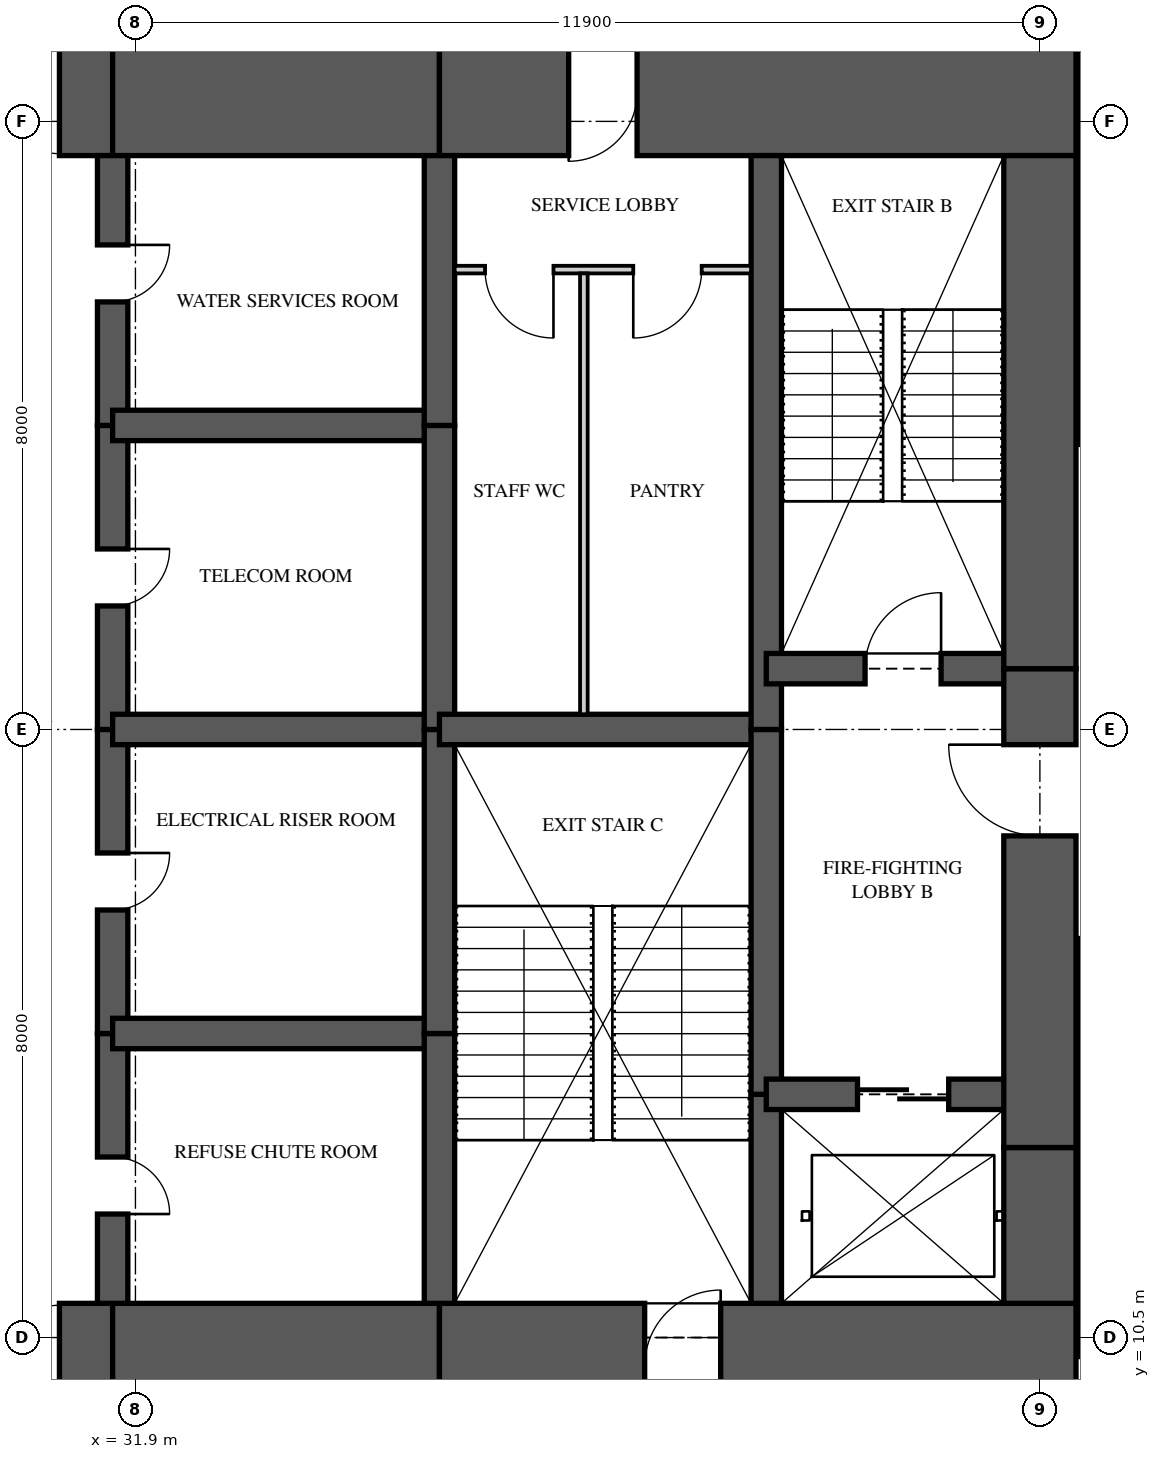
"""IFC4 building model, lengths in metres.
Left out: names, types, materials, properties, quantities, classifications, styles, units other than length and angle.
Written with IfcOpenShell. Run it as: python <this file> out.ifc"""

import sys

from ifc_helpers import new_model, si_unit, direction, frame, frame_2d, origin, place, context, subcontext, project, spatial, rectangle, extrude, element, fill, save


model = new_model("IFC4")
c1 = context("Model", 3, precision=1e-05, world=origin(), true_north=direction((0.0, 1.0)))
c2 = subcontext(c1, "Body", "Model", "MODEL_VIEW")
j1 = project(units=[si_unit("LENGTHUNIT", "METRE"), si_unit("PLANEANGLEUNIT", "RADIAN")], contexts=[c1])
p1 = place(None, origin())
s1 = spatial("IfcSite", under=j1, at=p1, CompositionType="ELEMENT")
p2 = place(p1, origin())
s2 = spatial("IfcBuilding", under=s1, at=p2, CompositionType="ELEMENT")
p3 = place(p2, frame((0.0, 0.0, 61.2)))
s3 = spatial("IfcBuildingStorey", under=s2, at=p3, CompositionType="ELEMENT", Elevation=61.2)
p4 = place(p3, frame((26.0, 10.125, 0.0), z_axis=(0.0, 0.0, 1.0), x_axis=(1.0, 0.0, 0.0)))
e1 = element("IfcWall", 1, at=p4, inside=s3, PredefinedType="SHEAR", context=c2, shape_type="SweptSolid", body=[
    extrude(rectangle(XDim=5.6, YDim=1.65, at=frame_2d((2.8, 0.0))), origin(), (0.0, 0.0, 1.0), 3.35),
])
p5 = place(p4, frame((3.3, 0.0, 0.0)))
e2 = element("IfcOpeningElement", 2, at=p5, cuts=e1, PredefinedType="OPENING", context=c2, shape_type="SweptSolid", body=[
    extrude(rectangle(XDim=1.6, YDim=2.1, at=frame_2d((0.8, 1.05))), frame((0.0, 0.835, 0.0), z_axis=(0.0, -1.0, 0.0), x_axis=(1.0, 0.0, 0.0)), (0.0, 0.0, 1.0), 1.67),
])
p6 = place(p3, frame((31.6, 10.125, 0.0), z_axis=(0.0, 0.0, 1.0), x_axis=(1.0, 0.0, 0.0)))
e3 = element("IfcWall", 3, at=p6, inside=s3, PredefinedType="SHEAR", context=c2, shape_type="SweptSolid", body=[
    extrude(rectangle(XDim=4.3, YDim=1.65, at=frame_2d((2.15, 0.0))), origin(), (0.0, 0.0, 1.0), 3.35),
])
p7 = place(p3, frame((35.9, 10.125, 0.0), z_axis=(0.0, 0.0, 1.0), x_axis=(1.0, 0.0, 0.0)))
e4 = element("IfcWall", 4, at=p7, inside=s3, PredefinedType="SHEAR", context=c2, shape_type="SweptSolid", body=[
    extrude(rectangle(XDim=8.375, YDim=1.65, at=frame_2d((4.188, 0.0))), origin(), (0.0, 0.0, 1.0), 3.35),
])
p8 = place(p7, frame((2.7, 0.0, 0.0)))
e5 = element("IfcOpeningElement", 5, at=p8, cuts=e4, PredefinedType="OPENING", context=c2, shape_type="SweptSolid", body=[
    extrude(rectangle(XDim=1.0, YDim=2.1, at=frame_2d((0.5, 1.05))), frame((0.0, 0.835, 0.0), z_axis=(0.0, -1.0, 0.0), x_axis=(1.0, 0.0, 0.0)), (0.0, 0.0, 1.0), 1.67),
])
p9 = place(p3, frame((44.275, 26.875, 0.0), z_axis=(0.0, 0.0, 1.0), x_axis=(-1.0, 0.0, 0.0)))
e6 = element("IfcWall", 6, at=p9, inside=s3, PredefinedType="SHEAR", context=c2, shape_type="SweptSolid", body=[
    extrude(rectangle(XDim=8.375, YDim=1.65, at=frame_2d((4.188, 0.0))), origin(), (0.0, 0.0, 1.0), 3.35),
])
p10 = place(p9, frame((5.775, 0.0, 0.0)))
e7 = element("IfcOpeningElement", 7, at=p10, cuts=e6, PredefinedType="OPENING", context=c2, shape_type="SweptSolid", body=[
    extrude(rectangle(XDim=0.9, YDim=2.1, at=frame_2d((0.45, 1.05))), frame((0.0, 0.835, 0.0), z_axis=(0.0, -1.0, 0.0), x_axis=(1.0, 0.0, 0.0)), (0.0, 0.0, 1.0), 1.67),
])
p11 = place(p3, frame((35.9, 26.875, 0.0), z_axis=(0.0, 0.0, 1.0), x_axis=(-1.0, 0.0, 0.0)))
e8 = element("IfcWall", 8, at=p11, inside=s3, PredefinedType="SHEAR", context=c2, shape_type="SweptSolid", body=[
    extrude(rectangle(XDim=4.3, YDim=1.65, at=frame_2d((2.15, 0.0))), origin(), (0.0, 0.0, 1.0), 3.35),
])
p12 = place(p3, frame((31.6, 26.875, 0.0), z_axis=(0.0, 0.0, 1.0), x_axis=(-1.0, 0.0, 0.0)))
e9 = element("IfcWall", 9, at=p12, inside=s3, PredefinedType="SHEAR", context=c2, shape_type="SweptSolid", body=[
    extrude(rectangle(XDim=5.6, YDim=1.65, at=frame_2d((2.8, 0.0))), origin(), (0.0, 0.0, 1.0), 3.35),
])
p13 = place(p12, frame((0.7, 0.0, 0.0)))
e10 = element("IfcOpeningElement", 10, at=p13, cuts=e9, PredefinedType="OPENING", context=c2, shape_type="SweptSolid", body=[
    extrude(rectangle(XDim=1.6, YDim=2.1, at=frame_2d((0.8, 1.05))), frame((0.0, 0.835, 0.0), z_axis=(0.0, -1.0, 0.0), x_axis=(1.0, 0.0, 0.0)), (0.0, 0.0, 1.0), 1.67),
])
p14 = place(p3, frame((43.8, 10.95, 0.0), z_axis=(0.0, 0.0, 1.0), x_axis=(0.0, 1.0, 0.0)))
e11 = element("IfcWall", 11, at=p14, inside=s3, PredefinedType="SHEAR", context=c2, shape_type="SweptSolid", body=[
    extrude(rectangle(XDim=2.05, YDim=0.95, at=frame_2d((1.025, 0.0))), origin(), (0.0, 0.0, 1.0), 3.35),
])
p15 = place(p3, frame((43.8, 13.0, 0.0), z_axis=(0.0, 0.0, 1.0), x_axis=(0.0, 1.0, 0.0)))
e12 = element("IfcWall", 12, at=p15, inside=s3, PredefinedType="SHEAR", context=c2, shape_type="SweptSolid", body=[
    extrude(rectangle(XDim=6.3, YDim=0.95, at=frame_2d((3.15, 0.0))), origin(), (0.0, 0.0, 1.0), 3.35),
])
p16 = place(p15, frame((4.1, 0.0, 0.0)))
e13 = element("IfcOpeningElement", 13, at=p16, cuts=e12, PredefinedType="OPENING", context=c2, shape_type="SweptSolid", body=[
    extrude(rectangle(XDim=1.2, YDim=2.2, at=frame_2d((0.6, 1.1))), frame((0.0, 0.485, 0.0), z_axis=(0.0, -1.0, 0.0), x_axis=(1.0, 0.0, 0.0)), (0.0, 0.0, 1.0), 0.97),
])
p17 = place(p3, frame((43.8, 19.3, 0.0), z_axis=(0.0, 0.0, 1.0), x_axis=(0.0, 1.0, 0.0)))
e14 = element("IfcWall", 14, at=p17, inside=s3, PredefinedType="SHEAR", context=c2, shape_type="SweptSolid", body=[
    extrude(rectangle(XDim=6.75, YDim=0.95, at=frame_2d((3.375, 0.0))), origin(), (0.0, 0.0, 1.0), 3.35),
])
p18 = place(p3, frame((31.6, 10.95, 0.0), z_axis=(0.0, 0.0, 1.0), x_axis=(0.0, 1.0, 0.0)))
e15 = element("IfcWall", 15, at=p18, inside=s3, PredefinedType="SHEAR", context=c2, shape_type="SweptSolid", body=[
    extrude(rectangle(XDim=3.55, YDim=0.4, at=frame_2d((1.775, 0.0))), origin(), (0.0, 0.0, 1.0), 3.35),
])
p19 = place(p18, frame((1.175, 0.0, 0.0)))
e16 = element("IfcOpeningElement", 16, at=p19, cuts=e15, PredefinedType="OPENING", context=c2, shape_type="SweptSolid", body=[
    extrude(rectangle(XDim=0.75, YDim=2.1, at=frame_2d((0.375, 1.05))), frame((0.0, 0.21, 0.0), z_axis=(0.0, -1.0, 0.0), x_axis=(1.0, 0.0, 0.0)), (0.0, 0.0, 1.0), 0.42),
])
p20 = place(p3, frame((31.6, 14.5, 0.0), z_axis=(0.0, 0.0, 1.0), x_axis=(0.0, 1.0, 0.0)))
e17 = element("IfcWall", 17, at=p20, inside=s3, PredefinedType="SHEAR", context=c2, shape_type="SweptSolid", body=[
    extrude(rectangle(XDim=4.0, YDim=0.4, at=frame_2d((2.0, 0.0))), origin(), (0.0, 0.0, 1.0), 3.35),
])
p21 = place(p20, frame((1.625, 0.0, 0.0)))
e18 = element("IfcOpeningElement", 18, at=p21, cuts=e17, PredefinedType="OPENING", context=c2, shape_type="SweptSolid", body=[
    extrude(rectangle(XDim=0.75, YDim=2.1, at=frame_2d((0.375, 1.05))), frame((0.0, 0.21, 0.0), z_axis=(0.0, -1.0, 0.0), x_axis=(1.0, 0.0, 0.0)), (0.0, 0.0, 1.0), 0.42),
])
p22 = place(p3, frame((31.6, 18.5, 0.0), z_axis=(0.0, 0.0, 1.0), x_axis=(0.0, 1.0, 0.0)))
e19 = element("IfcWall", 19, at=p22, inside=s3, PredefinedType="SHEAR", context=c2, shape_type="SweptSolid", body=[
    extrude(rectangle(XDim=4.0, YDim=0.4, at=frame_2d((2.0, 0.0))), origin(), (0.0, 0.0, 1.0), 3.35),
])
p23 = place(p22, frame((1.625, 0.0, 0.0)))
e20 = element("IfcOpeningElement", 20, at=p23, cuts=e19, PredefinedType="OPENING", context=c2, shape_type="SweptSolid", body=[
    extrude(rectangle(XDim=0.75, YDim=2.1, at=frame_2d((0.375, 1.05))), frame((0.0, 0.21, 0.0), z_axis=(0.0, -1.0, 0.0), x_axis=(1.0, 0.0, 0.0)), (0.0, 0.0, 1.0), 0.42),
])
p24 = place(p3, frame((31.6, 22.5, 0.0), z_axis=(0.0, 0.0, 1.0), x_axis=(0.0, 1.0, 0.0)))
e21 = element("IfcWall", 21, at=p24, inside=s3, PredefinedType="SHEAR", context=c2, shape_type="SweptSolid", body=[
    extrude(rectangle(XDim=3.55, YDim=0.4, at=frame_2d((1.775, 0.0))), origin(), (0.0, 0.0, 1.0), 3.35),
])
p25 = place(p24, frame((1.625, 0.0, 0.0)))
e22 = element("IfcOpeningElement", 22, at=p25, cuts=e21, PredefinedType="OPENING", context=c2, shape_type="SweptSolid", body=[
    extrude(rectangle(XDim=0.75, YDim=2.1, at=frame_2d((0.375, 1.05))), frame((0.0, 0.21, 0.0), z_axis=(0.0, -1.0, 0.0), x_axis=(1.0, 0.0, 0.0)), (0.0, 0.0, 1.0), 0.42),
])
p26 = place(p3, frame((35.9, 10.95, 0.0), z_axis=(0.0, 0.0, 1.0), x_axis=(0.0, 1.0, 0.0)))
e23 = element("IfcWall", 23, at=p26, inside=s3, PredefinedType="SHEAR", context=c2, shape_type="SweptSolid", body=[
    extrude(rectangle(XDim=3.55, YDim=0.4, at=frame_2d((1.775, 0.0))), origin(), (0.0, 0.0, 1.0), 3.35),
])
for number, where, z_axis, x_axis in (
    (24, (35.9, 14.5, 0.0), (0.0, 0.0, 1.0), (0.0, 1.0, 0.0)),
    (25, (35.9, 18.5, 0.0), (0.0, 0.0, 1.0), (0.0, 1.0, 0.0)),
):
    element("IfcWall", number, at=place(p3, frame(where, z_axis=z_axis, x_axis=x_axis)), inside=s3, PredefinedType="SHEAR", context=c2, shape_type="SweptSolid", body=[
        extrude(rectangle(XDim=4.0, YDim=0.4, at=frame_2d((2.0, 0.0))), origin(), (0.0, 0.0, 1.0), 3.35),
    ])
p27 = place(p3, frame((35.9, 22.5, 0.0), z_axis=(0.0, 0.0, 1.0), x_axis=(0.0, 1.0, 0.0)))
e26 = element("IfcWall", 26, at=p27, inside=s3, PredefinedType="SHEAR", context=c2, shape_type="SweptSolid", body=[
    extrude(rectangle(XDim=3.55, YDim=0.4, at=frame_2d((1.775, 0.0))), origin(), (0.0, 0.0, 1.0), 3.35),
])
p28 = place(p3, frame((40.2, 10.95, 0.0), z_axis=(0.0, 0.0, 1.0), x_axis=(0.0, 1.0, 0.0)))
e27 = element("IfcWall", 27, at=p28, inside=s3, PredefinedType="SHEAR", context=c2, shape_type="SweptSolid", body=[
    extrude(rectangle(XDim=2.75, YDim=0.4, at=frame_2d((1.375, 0.0))), origin(), (0.0, 0.0, 1.0), 3.35),
])
p29 = place(p3, frame((40.2, 13.7, 0.0), z_axis=(0.0, 0.0, 1.0), x_axis=(0.0, 1.0, 0.0)))
e28 = element("IfcWall", 28, at=p29, inside=s3, PredefinedType="SHEAR", context=c2, shape_type="SweptSolid", body=[
    extrude(rectangle(XDim=4.8, YDim=0.4, at=frame_2d((2.4, 0.0))), origin(), (0.0, 0.0, 1.0), 3.35),
])
p30 = place(p3, frame((40.2, 18.5, 0.0), z_axis=(0.0, 0.0, 1.0), x_axis=(0.0, 1.0, 0.0)))
e29 = element("IfcWall", 29, at=p30, inside=s3, PredefinedType="SHEAR", context=c2, shape_type="SweptSolid", body=[
    extrude(rectangle(XDim=7.55, YDim=0.4, at=frame_2d((3.775, 0.0))), origin(), (0.0, 0.0, 1.0), 3.35),
])
for number, where, z_axis, x_axis in (
    (30, (31.6, 14.5, 0.0), (0.0, 0.0, 1.0), (1.0, 0.0, 0.0)),
    (31, (31.6, 18.5, 0.0), (0.0, 0.0, 1.0), (1.0, 0.0, 0.0)),
    (32, (31.6, 22.5, 0.0), (0.0, 0.0, 1.0), (1.0, 0.0, 0.0)),
):
    element("IfcWall", number, at=place(p3, frame(where, z_axis=z_axis, x_axis=x_axis)), inside=s3, PredefinedType="SHEAR", context=c2, shape_type="SweptSolid", body=[
        extrude(rectangle(XDim=4.3, YDim=0.4, at=frame_2d((2.15, 0.0))), origin(), (0.0, 0.0, 1.0), 3.35),
    ])
p31 = place(p3, frame((35.9, 18.5, 0.0), z_axis=(0.0, 0.0, 1.0), x_axis=(1.0, 0.0, 0.0)))
e33 = element("IfcWall", 33, at=p31, inside=s3, PredefinedType="SHEAR", context=c2, shape_type="SweptSolid", body=[
    extrude(rectangle(XDim=4.3, YDim=0.4, at=frame_2d((2.15, 0.0))), origin(), (0.0, 0.0, 1.0), 3.35),
])
p32 = place(p3, frame((40.2, 13.7, 0.0), z_axis=(0.0, 0.0, 1.0), x_axis=(1.0, 0.0, 0.0)))
e34 = element("IfcWall", 34, at=p32, inside=s3, PredefinedType="SHEAR", context=c2, shape_type="SweptSolid", body=[
    extrude(rectangle(XDim=3.6, YDim=0.4, at=frame_2d((1.8, 0.0))), origin(), (0.0, 0.0, 1.0), 3.35),
])
p33 = place(p32, frame((1.2, 0.0, 0.0)))
e35 = element("IfcOpeningElement", 35, at=p33, cuts=e34, PredefinedType="OPENING", context=c2, shape_type="SweptSolid", body=[
    extrude(rectangle(XDim=1.2, YDim=2.1, at=frame_2d((0.6, 1.05))), frame((0.0, 0.21, 0.0), z_axis=(0.0, -1.0, 0.0), x_axis=(1.0, 0.0, 0.0)), (0.0, 0.0, 1.0), 0.42),
])
p34 = place(p3, frame((40.2, 19.3, 0.0), z_axis=(0.0, 0.0, 1.0), x_axis=(1.0, 0.0, 0.0)))
e36 = element("IfcWall", 36, at=p34, inside=s3, PredefinedType="SHEAR", context=c2, shape_type="SweptSolid", body=[
    extrude(rectangle(XDim=3.6, YDim=0.4, at=frame_2d((1.8, 0.0))), origin(), (0.0, 0.0, 1.0), 3.35),
])
p35 = place(p34, frame((1.3, 0.0, 0.0)))
e37 = element("IfcOpeningElement", 37, at=p35, cuts=e36, PredefinedType="OPENING", context=c2, shape_type="SweptSolid", body=[
    extrude(rectangle(XDim=1.0, YDim=2.1, at=frame_2d((0.5, 1.05))), frame((0.0, 0.21, 0.0), z_axis=(0.0, -1.0, 0.0), x_axis=(1.0, 0.0, 0.0)), (0.0, 0.0, 1.0), 0.42),
])
p36 = place(p3, frame((36.1, 24.55, 0.0), z_axis=(0.0, 0.0, 1.0), x_axis=(1.0, 0.0, 0.0)))
e38 = element("IfcWall", 38, at=p36, inside=s3, PredefinedType="PARTITIONING", context=c2, shape_type="SweptSolid", body=[
    extrude(rectangle(XDim=3.9, YDim=0.1, at=frame_2d((1.95, 0.0))), origin(), (0.0, 0.0, 1.0), 3.11),
])
p37 = place(p36, frame((0.4, 0.0, 0.0)))
e39 = element("IfcOpeningElement", 39, at=p37, cuts=e38, PredefinedType="OPENING", context=c2, shape_type="SweptSolid", body=[
    extrude(rectangle(XDim=0.9, YDim=2.1, at=frame_2d((0.45, 1.05))), frame((0.0, 0.06, 0.0), z_axis=(0.0, -1.0, 0.0), x_axis=(1.0, 0.0, 0.0)), (0.0, 0.0, 1.0), 0.12),
])
p38 = place(p36, frame((2.35, 0.0, 0.0)))
e40 = element("IfcOpeningElement", 40, at=p38, cuts=e38, PredefinedType="OPENING", context=c2, shape_type="SweptSolid", body=[
    extrude(rectangle(XDim=0.9, YDim=2.1, at=frame_2d((0.45, 1.05))), frame((0.0, 0.06, 0.0), z_axis=(0.0, -1.0, 0.0), x_axis=(1.0, 0.0, 0.0)), (0.0, 0.0, 1.0), 0.12),
])
p39 = place(p3, frame((37.8, 18.7, 0.0), z_axis=(0.0, 0.0, 1.0), x_axis=(0.0, 1.0, 0.0)))
e41 = element("IfcWall", 41, at=p39, inside=s3, PredefinedType="PARTITIONING", context=c2, shape_type="SweptSolid", body=[
    extrude(rectangle(XDim=5.8, YDim=0.1, at=frame_2d((2.9, 0.0))), origin(), (0.0, 0.0, 1.0), 3.11),
])
p40 = place(p37, frame((0.9, 0.0, 0.0), z_axis=(0.0, 0.0, 1.0), x_axis=(-1.0, 0.0, 0.0)))
e42 = element("IfcDoor", 42, at=p40, inside=s3, OperationType="SINGLE_SWING_LEFT", PredefinedType="DOOR", context=c2, shape_type="SweptSolid", body=[
    extrude(rectangle(XDim=0.9, YDim=2.1, at=frame_2d((0.45, 1.05))), frame((0.0, 0.025, 0.0), z_axis=(0.0, -1.0, 0.0), x_axis=(1.0, 0.0, 0.0)), (0.0, 0.0, 1.0), 0.05),
])
fill(e39, e42)
p41 = place(p38, frame((0.9, 0.0, 0.0), z_axis=(0.0, 0.0, 1.0), x_axis=(-1.0, 0.0, 0.0)))
e43 = element("IfcDoor", 43, at=p41, inside=s3, OperationType="SINGLE_SWING_RIGHT", PredefinedType="DOOR", context=c2, shape_type="SweptSolid", body=[
    extrude(rectangle(XDim=0.9, YDim=2.1, at=frame_2d((0.45, 1.05))), frame((0.0, 0.025, 0.0), z_axis=(0.0, -1.0, 0.0), x_axis=(1.0, 0.0, 0.0)), (0.0, 0.0, 1.0), 0.05),
])
fill(e40, e43)
p42 = place(p35, origin())
e44 = element("IfcDoor", 44, at=p42, inside=s3, OperationType="SINGLE_SWING_RIGHT", PredefinedType="DOOR", context=c2, shape_type="SweptSolid", body=[
    extrude(rectangle(XDim=1.0, YDim=2.1, at=frame_2d((0.5, 1.05))), frame((0.0, 0.025, 0.0), z_axis=(0.0, -1.0, 0.0), x_axis=(1.0, 0.0, 0.0)), (0.0, 0.0, 1.0), 0.05),
])
fill(e37, e44)
p43 = place(p16, origin())
e45 = element("IfcDoor", 45, at=p43, inside=s3, OperationType="SINGLE_SWING_RIGHT", PredefinedType="DOOR", context=c2, shape_type="SweptSolid", body=[
    extrude(rectangle(XDim=1.2, YDim=2.2, at=frame_2d((0.6, 1.1))), frame((0.0, 0.025, 0.0), z_axis=(0.0, -1.0, 0.0), x_axis=(1.0, 0.0, 0.0)), (0.0, 0.0, 1.0), 0.05),
])
fill(e13, e45)
p44 = place(p33, origin())
e46 = element("IfcDoor", 46, at=p44, inside=s3, OperationType="SLIDING_TO_LEFT", PredefinedType="DOOR", context=c2, shape_type="SweptSolid", body=[
    extrude(rectangle(XDim=1.2, YDim=2.1, at=frame_2d((0.6, 1.05))), frame((0.0, 0.025, 0.0), z_axis=(0.0, -1.0, 0.0), x_axis=(1.0, 0.0, 0.0)), (0.0, 0.0, 1.0), 0.05),
])
fill(e35, e46)
p45 = place(p5, origin())
e47 = element("IfcDoor", 47, at=p45, inside=s3, OperationType="DOUBLE_DOOR_SINGLE_SWING", PredefinedType="DOOR", context=c2, shape_type="SweptSolid", body=[
    extrude(rectangle(XDim=1.6, YDim=2.1, at=frame_2d((0.8, 1.05))), frame((0.0, 0.025, 0.0), z_axis=(0.0, -1.0, 0.0), x_axis=(1.0, 0.0, 0.0)), (0.0, 0.0, 1.0), 0.05),
])
fill(e2, e47)
p46 = place(p13, origin())
e48 = element("IfcDoor", 48, at=p46, inside=s3, OperationType="DOUBLE_DOOR_SINGLE_SWING", PredefinedType="DOOR", context=c2, shape_type="SweptSolid", body=[
    extrude(rectangle(XDim=1.6, YDim=2.1, at=frame_2d((0.8, 1.05))), frame((0.0, 0.025, 0.0), z_axis=(0.0, -1.0, 0.0), x_axis=(1.0, 0.0, 0.0)), (0.0, 0.0, 1.0), 0.05),
])
fill(e10, e48)
p47 = place(p19, frame((0.75, 0.0, 0.0), z_axis=(0.0, 0.0, 1.0), x_axis=(-1.0, 0.0, 0.0)))
e49 = element("IfcDoor", 49, at=p47, inside=s3, OperationType="SINGLE_SWING_RIGHT", PredefinedType="DOOR", context=c2, shape_type="SweptSolid", body=[
    extrude(rectangle(XDim=0.75, YDim=2.1, at=frame_2d((0.375, 1.05))), frame((0.0, 0.025, 0.0), z_axis=(0.0, -1.0, 0.0), x_axis=(1.0, 0.0, 0.0)), (0.0, 0.0, 1.0), 0.05),
])
fill(e16, e49)
p48 = place(p21, frame((0.75, 0.0, 0.0), z_axis=(0.0, 0.0, 1.0), x_axis=(-1.0, 0.0, 0.0)))
e50 = element("IfcDoor", 50, at=p48, inside=s3, OperationType="SINGLE_SWING_LEFT", PredefinedType="DOOR", context=c2, shape_type="SweptSolid", body=[
    extrude(rectangle(XDim=0.75, YDim=2.1, at=frame_2d((0.375, 1.05))), frame((0.0, 0.025, 0.0), z_axis=(0.0, -1.0, 0.0), x_axis=(1.0, 0.0, 0.0)), (0.0, 0.0, 1.0), 0.05),
])
fill(e18, e50)
p49 = place(p23, frame((0.75, 0.0, 0.0), z_axis=(0.0, 0.0, 1.0), x_axis=(-1.0, 0.0, 0.0)))
e51 = element("IfcDoor", 51, at=p49, inside=s3, OperationType="SINGLE_SWING_LEFT", PredefinedType="DOOR", context=c2, shape_type="SweptSolid", body=[
    extrude(rectangle(XDim=0.75, YDim=2.1, at=frame_2d((0.375, 1.05))), frame((0.0, 0.025, 0.0), z_axis=(0.0, -1.0, 0.0), x_axis=(1.0, 0.0, 0.0)), (0.0, 0.0, 1.0), 0.05),
])
fill(e20, e51)
p50 = place(p25, frame((0.75, 0.0, 0.0), z_axis=(0.0, 0.0, 1.0), x_axis=(-1.0, 0.0, 0.0)))
e52 = element("IfcDoor", 52, at=p50, inside=s3, OperationType="SINGLE_SWING_LEFT", PredefinedType="DOOR", context=c2, shape_type="SweptSolid", body=[
    extrude(rectangle(XDim=0.75, YDim=2.1, at=frame_2d((0.375, 1.05))), frame((0.0, 0.025, 0.0), z_axis=(0.0, -1.0, 0.0), x_axis=(1.0, 0.0, 0.0)), (0.0, 0.0, 1.0), 0.05),
])
fill(e22, e52)
p51 = place(p8, origin())
e53 = element("IfcDoor", 53, at=p51, inside=s3, OperationType="SINGLE_SWING_RIGHT", PredefinedType="DOOR", context=c2, shape_type="SweptSolid", body=[
    extrude(rectangle(XDim=1.0, YDim=2.1, at=frame_2d((0.5, 1.05))), frame((0.0, 0.025, 0.0), z_axis=(0.0, -1.0, 0.0), x_axis=(1.0, 0.0, 0.0)), (0.0, 0.0, 1.0), 0.05),
])
fill(e5, e53)
p52 = place(p10, origin())
e54 = element("IfcDoor", 54, at=p52, inside=s3, OperationType="SINGLE_SWING_RIGHT", PredefinedType="DOOR", context=c2, shape_type="SweptSolid", body=[
    extrude(rectangle(XDim=0.9, YDim=2.1, at=frame_2d((0.45, 1.05))), frame((0.0, 0.47, 0.0), z_axis=(0.0, -1.0, 0.0), x_axis=(1.0, 0.0, 0.0)), (0.0, 0.0, 1.0), 0.8),
])
fill(e7, e54)
save(model, sys.argv[1])
